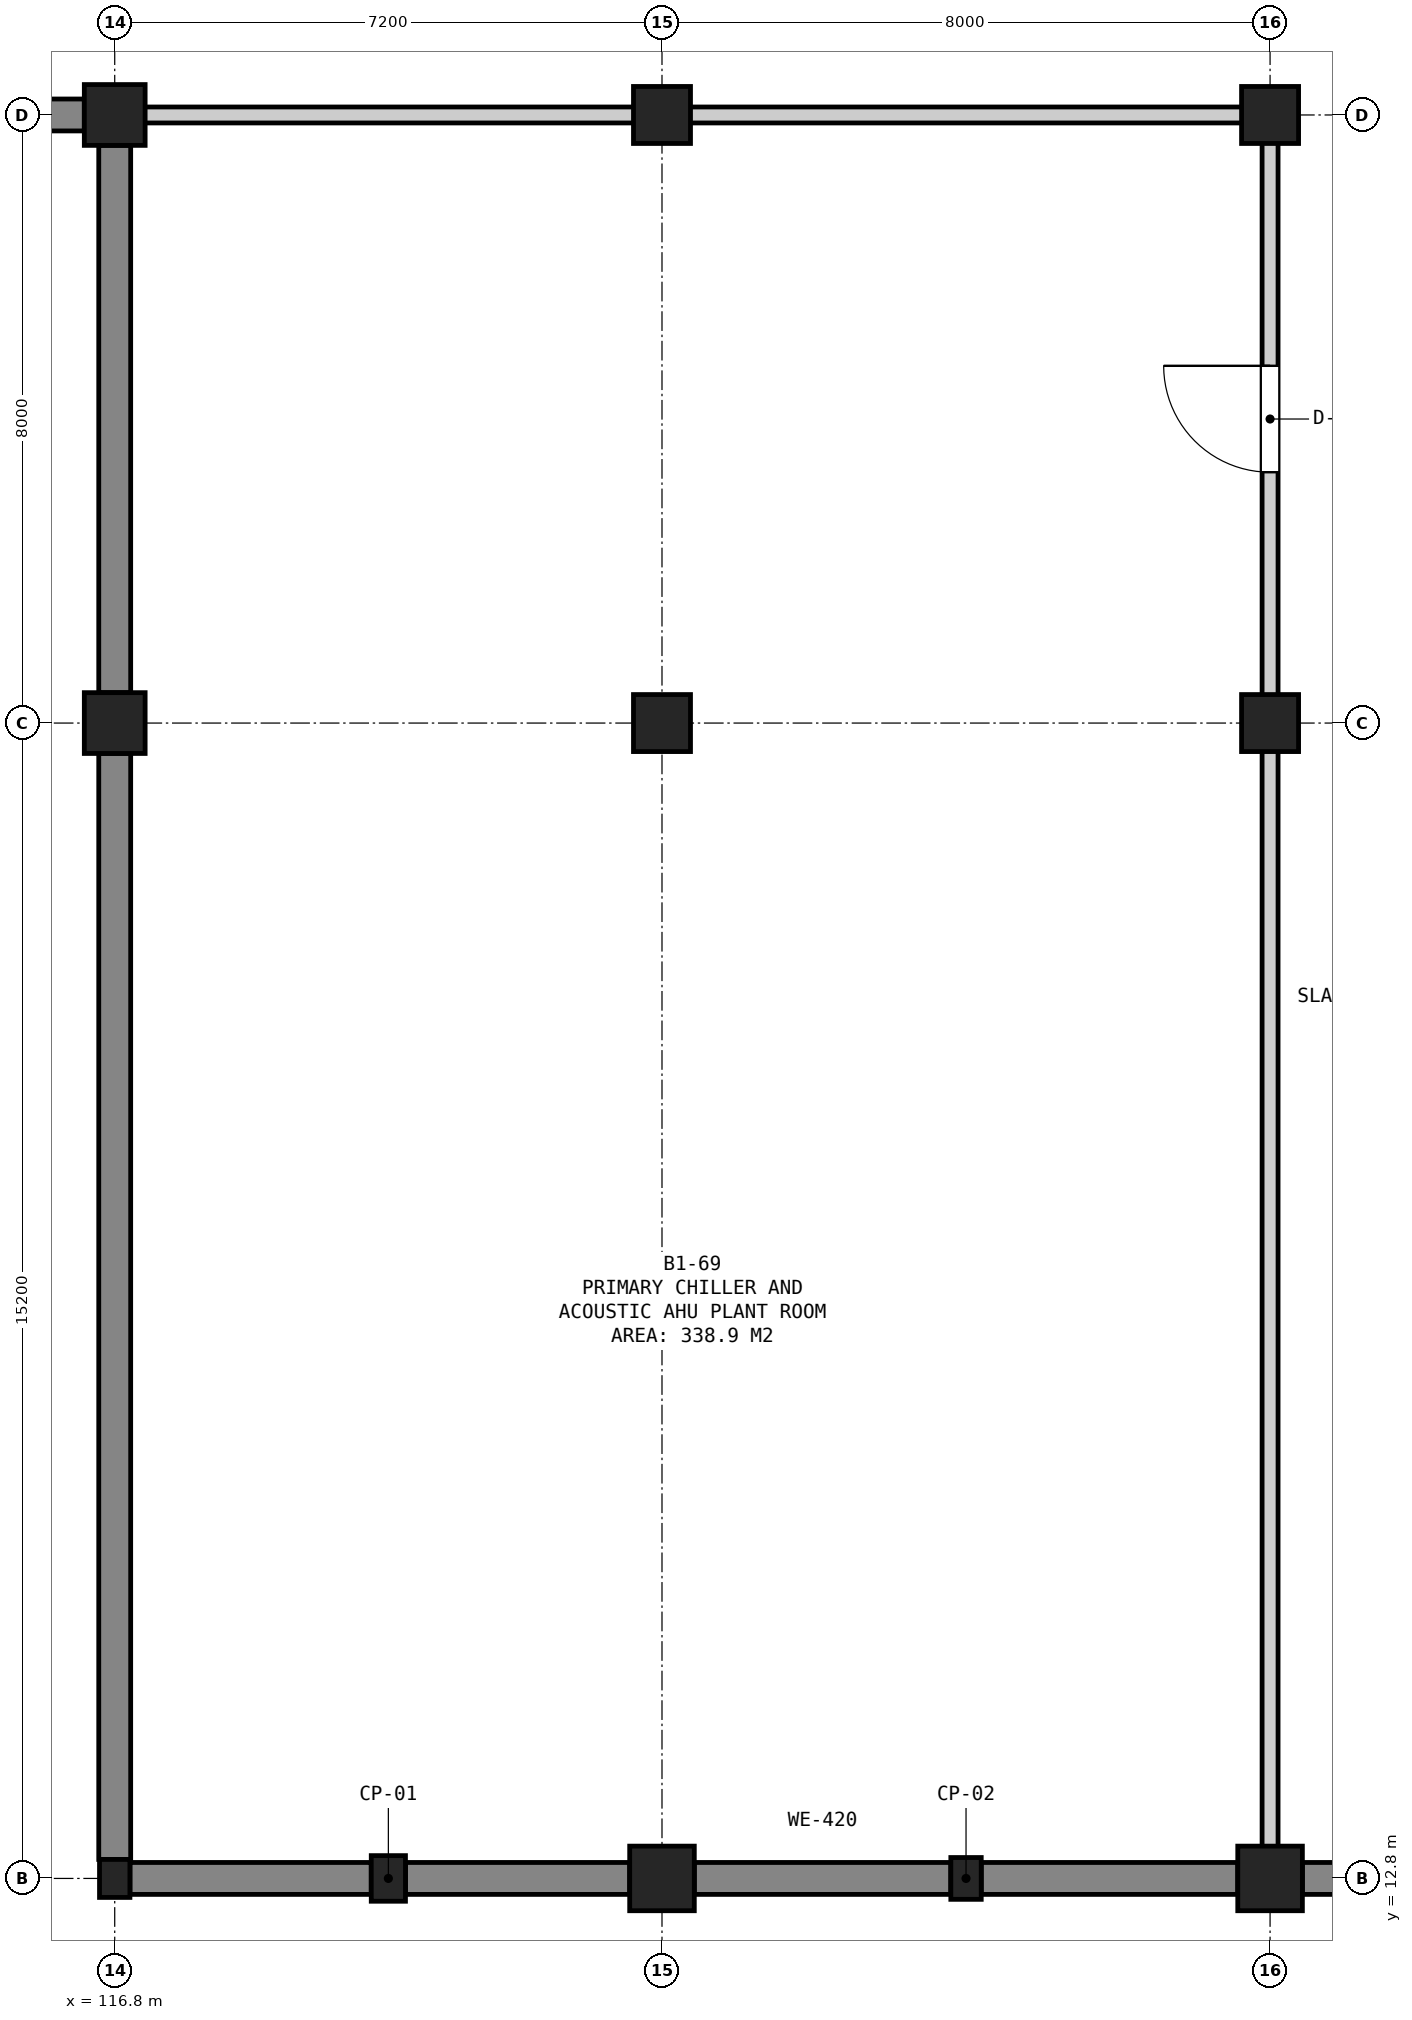
"""IFC4 building model, lengths in metres.
Left out: names, types, materials, properties, quantities, classifications, styles, units other than length and angle.
Written with IfcOpenShell. Run it as: python <this file> out.ifc"""

import sys

from ifc_helpers import new_model, si_unit, direction, frame, frame_2d, origin, origin_2d, place, context, subcontext, project, spatial, rectangle, extrude, element, fill, save


model = new_model("IFC4")
c1 = context("Model", 3, precision=1e-05, world=origin(), true_north=direction((0.0, 1.0)))
c2 = subcontext(c1, "Body", "Model", "MODEL_VIEW")
j1 = project(units=[si_unit("LENGTHUNIT", "METRE"), si_unit("PLANEANGLEUNIT", "RADIAN")], contexts=[c1])
p1 = place(None, origin())
s1 = spatial("IfcSite", under=j1, at=p1, CompositionType="ELEMENT")
p2 = place(p1, origin())
s2 = spatial("IfcBuilding", under=s1, at=p2, CompositionType="ELEMENT")
p3 = place(p2, frame((0.0, 0.0, -4.5)))
s3 = spatial("IfcBuildingStorey", under=s2, at=p3, CompositionType="ELEMENT", Elevation=-4.5)
p4 = place(p3, frame((116.8, 12.8, 0.0), z_axis=(0.0, 0.0, 1.0), x_axis=(1.0, 0.0, 0.0)))
e1 = element("IfcColumn", 1, at=p4, inside=s3, PredefinedType="COLUMN", context=c2, shape_type="SweptSolid", body=[
    extrude(rectangle(XDim=0.4, YDim=0.5, at=origin_2d()), origin(), (0.0, 0.0, 1.0), 4.5),
])
for number, where, z_axis, x_axis in (
    (2, (116.8, 28.0, 0.0), (0.0, 0.0, 1.0), (1.0, 0.0, 0.0)),
    (3, (116.8, 36.0, 0.0), (0.0, 0.0, 1.0), (1.0, 0.0, 0.0)),
):
    element("IfcColumn", number, at=place(p3, frame(where, z_axis=z_axis, x_axis=x_axis)), inside=s3, PredefinedType="COLUMN", context=c2, shape_type="SweptSolid", body=[
        extrude(rectangle(XDim=0.8, YDim=0.8, at=origin_2d()), origin(), (0.0, 0.0, 1.0), 4.5),
    ])
p5 = place(p3, frame((124.0, 12.8, 0.0), z_axis=(0.0, 0.0, 1.0), x_axis=(1.0, 0.0, 0.0)))
e4 = element("IfcColumn", 4, at=p5, inside=s3, PredefinedType="COLUMN", context=c2, shape_type="SweptSolid", body=[
    extrude(rectangle(XDim=0.85, YDim=0.85, at=origin_2d()), origin(), (0.0, 0.0, 1.0), 4.5),
])
for number, where, z_axis, x_axis in (
    (5, (124.0, 28.0, 0.0), (0.0, 0.0, 1.0), (1.0, 0.0, 0.0)),
    (6, (124.0, 36.0, 0.0), (0.0, 0.0, 1.0), (1.0, 0.0, 0.0)),
):
    element("IfcColumn", number, at=place(p3, frame(where, z_axis=z_axis, x_axis=x_axis)), inside=s3, PredefinedType="COLUMN", context=c2, shape_type="SweptSolid", body=[
        extrude(rectangle(XDim=0.75, YDim=0.75, at=origin_2d()), origin(), (0.0, 0.0, 1.0), 4.5),
    ])
p6 = place(p3, frame((132.0, 12.8, 0.0), z_axis=(0.0, 0.0, 1.0), x_axis=(1.0, 0.0, 0.0)))
e7 = element("IfcColumn", 7, at=p6, inside=s3, PredefinedType="COLUMN", context=c2, shape_type="SweptSolid", body=[
    extrude(rectangle(XDim=0.85, YDim=0.85, at=origin_2d()), origin(), (0.0, 0.0, 1.0), 4.5),
])
for number, where, z_axis, x_axis in (
    (8, (132.0, 28.0, 0.0), (0.0, 0.0, 1.0), (1.0, 0.0, 0.0)),
    (9, (132.0, 36.0, 0.0), (0.0, 0.0, 1.0), (1.0, 0.0, 0.0)),
):
    element("IfcColumn", number, at=place(p3, frame(where, z_axis=z_axis, x_axis=x_axis)), inside=s3, PredefinedType="COLUMN", context=c2, shape_type="SweptSolid", body=[
        extrude(rectangle(XDim=0.75, YDim=0.75, at=origin_2d()), origin(), (0.0, 0.0, 1.0), 4.5),
    ])
p7 = place(p3, frame((120.4, 12.8, 0.0), z_axis=(0.0, 0.0, 1.0), x_axis=(1.0, 0.0, 0.0)))
e10 = element("IfcColumn", 10, at=p7, inside=s3, PredefinedType="PILASTER", context=c2, shape_type="SweptSolid", body=[
    extrude(rectangle(XDim=0.45, YDim=0.6, at=origin_2d()), origin(), (0.0, 0.0, 1.0), 4.5),
])
p8 = place(p3, frame((128.0, 12.8, 0.0), z_axis=(0.0, 0.0, 1.0), x_axis=(1.0, 0.0, 0.0)))
e11 = element("IfcColumn", 11, at=p8, inside=s3, PredefinedType="PILASTER", context=c2, shape_type="SweptSolid", body=[
    extrude(rectangle(XDim=0.4, YDim=0.55, at=origin_2d()), origin(), (0.0, 0.0, 1.0), 4.5),
])
p9 = place(p3, frame((110.825, 36.0, 0.0), z_axis=(0.0, 0.0, 1.0), x_axis=(1.0, 0.0, 0.0)))
e12 = element("IfcWall", 12, at=p9, inside=s3, PredefinedType="SOLIDWALL", context=c2, shape_type="SweptSolid", body=[
    extrude(rectangle(XDim=5.575, YDim=0.42, at=frame_2d((2.788, 0.0))), origin(), (0.0, 0.0, 1.0), 4.08),
])
p10 = place(p3, frame((116.8, 35.6, 0.0), z_axis=(0.0, 0.0, 1.0), x_axis=(0.0, -1.0, 0.0)))
e13 = element("IfcWall", 13, at=p10, inside=s3, PredefinedType="SOLIDWALL", context=c2, shape_type="SweptSolid", body=[
    extrude(rectangle(XDim=7.2, YDim=0.42, at=frame_2d((3.6, 0.0))), origin(), (0.0, 0.0, 1.0), 4.08),
])
p11 = place(p3, frame((116.8, 27.6, 0.0), z_axis=(0.0, 0.0, 1.0), x_axis=(0.0, -1.0, 0.0)))
e14 = element("IfcWall", 14, at=p11, inside=s3, PredefinedType="SOLIDWALL", context=c2, shape_type="SweptSolid", body=[
    extrude(rectangle(XDim=14.55, YDim=0.42, at=frame_2d((7.275, 0.0))), origin(), (0.0, 0.0, 1.0), 4.08),
])
p12 = place(p3, frame((117.0, 12.8, 0.0), z_axis=(0.0, 0.0, 1.0), x_axis=(1.0, 0.0, 0.0)))
e15 = element("IfcWall", 15, at=p12, inside=s3, PredefinedType="SOLIDWALL", context=c2, shape_type="SweptSolid", body=[
    extrude(rectangle(XDim=3.175, YDim=0.42, at=frame_2d((1.587, 0.0))), origin(), (0.0, 0.0, 1.0), 4.08),
])
p13 = place(p3, frame((120.625, 12.8, 0.0), z_axis=(0.0, 0.0, 1.0), x_axis=(1.0, 0.0, 0.0)))
e16 = element("IfcWall", 16, at=p13, inside=s3, PredefinedType="SOLIDWALL", context=c2, shape_type="SweptSolid", body=[
    extrude(rectangle(XDim=2.95, YDim=0.42, at=frame_2d((1.475, 0.0))), origin(), (0.0, 0.0, 1.0), 4.08),
])
for number, where, z_axis, x_axis in (
    (17, (124.425, 12.8, 0.0), (0.0, 0.0, 1.0), (1.0, 0.0, 0.0)),
    (18, (128.2, 12.8, 0.0), (0.0, 0.0, 1.0), (1.0, 0.0, 0.0)),
):
    element("IfcWall", number, at=place(p3, frame(where, z_axis=z_axis, x_axis=x_axis)), inside=s3, PredefinedType="SOLIDWALL", context=c2, shape_type="SweptSolid", body=[
        extrude(rectangle(XDim=3.375, YDim=0.42, at=frame_2d((1.688, 0.0))), origin(), (0.0, 0.0, 1.0), 4.08),
    ])
p14 = place(p3, frame((132.425, 12.8, 0.0), z_axis=(0.0, 0.0, 1.0), x_axis=(1.0, 0.0, 0.0)))
e19 = element("IfcWall", 19, at=p14, inside=s3, PredefinedType="SOLIDWALL", context=c2, shape_type="SweptSolid", body=[
    extrude(rectangle(XDim=3.4, YDim=0.42, at=frame_2d((1.7, 0.0))), origin(), (0.0, 0.0, 1.0), 4.08),
])
p15 = place(p3, frame((116.905, 36.0, 0.0), z_axis=(0.0, 0.0, 1.0), x_axis=(1.0, 0.0, 0.0)))
e20 = element("IfcWall", 20, at=p15, inside=s3, PredefinedType="SOLIDWALL", context=c2, shape_type="SweptSolid", body=[
    extrude(rectangle(XDim=14.955, YDim=0.21, at=frame_2d((7.478, 0.0))), origin(), (0.0, 0.0, 1.0), 3.225),
])
p16 = place(p3, frame((132.0, 12.905, 0.0), z_axis=(0.0, 0.0, 1.0), x_axis=(0.0, 1.0, 0.0)))
e21 = element("IfcWall", 21, at=p16, inside=s3, PredefinedType="SOLIDWALL", context=c2, shape_type="SweptSolid", body=[
    extrude(rectangle(XDim=22.955, YDim=0.21, at=frame_2d((11.478, 0.0))), origin(), (0.0, 0.0, 1.0), 2.925),
])
p17 = place(p16, frame((18.395, 0.0, 0.0)))
e22 = element("IfcOpeningElement", 22, at=p17, cuts=e21, PredefinedType="OPENING", context=c2, shape_type="SweptSolid", body=[
    extrude(rectangle(XDim=1.4, YDim=2.2, at=frame_2d((0.7, 1.1))), frame((0.0, 0.117, 0.0), z_axis=(0.0, -1.0, 0.0), x_axis=(1.0, 0.0, 0.0)), (0.0, 0.0, 1.0), 0.234),
])
p18 = place(p17, origin())
e23 = element("IfcDoor", 23, at=p18, inside=s3, OperationType="SINGLE_SWING_RIGHT", PredefinedType="DOOR", context=c2, shape_type="SweptSolid", body=[
    extrude(rectangle(XDim=1.4, YDim=2.2, at=frame_2d((0.7, 1.1))), frame((0.0, 0.025, 0.0), z_axis=(0.0, -1.0, 0.0), x_axis=(1.0, 0.0, 0.0)), (0.0, 0.0, 1.0), 0.05),
])
fill(e22, e23)
save(model, sys.argv[1])
